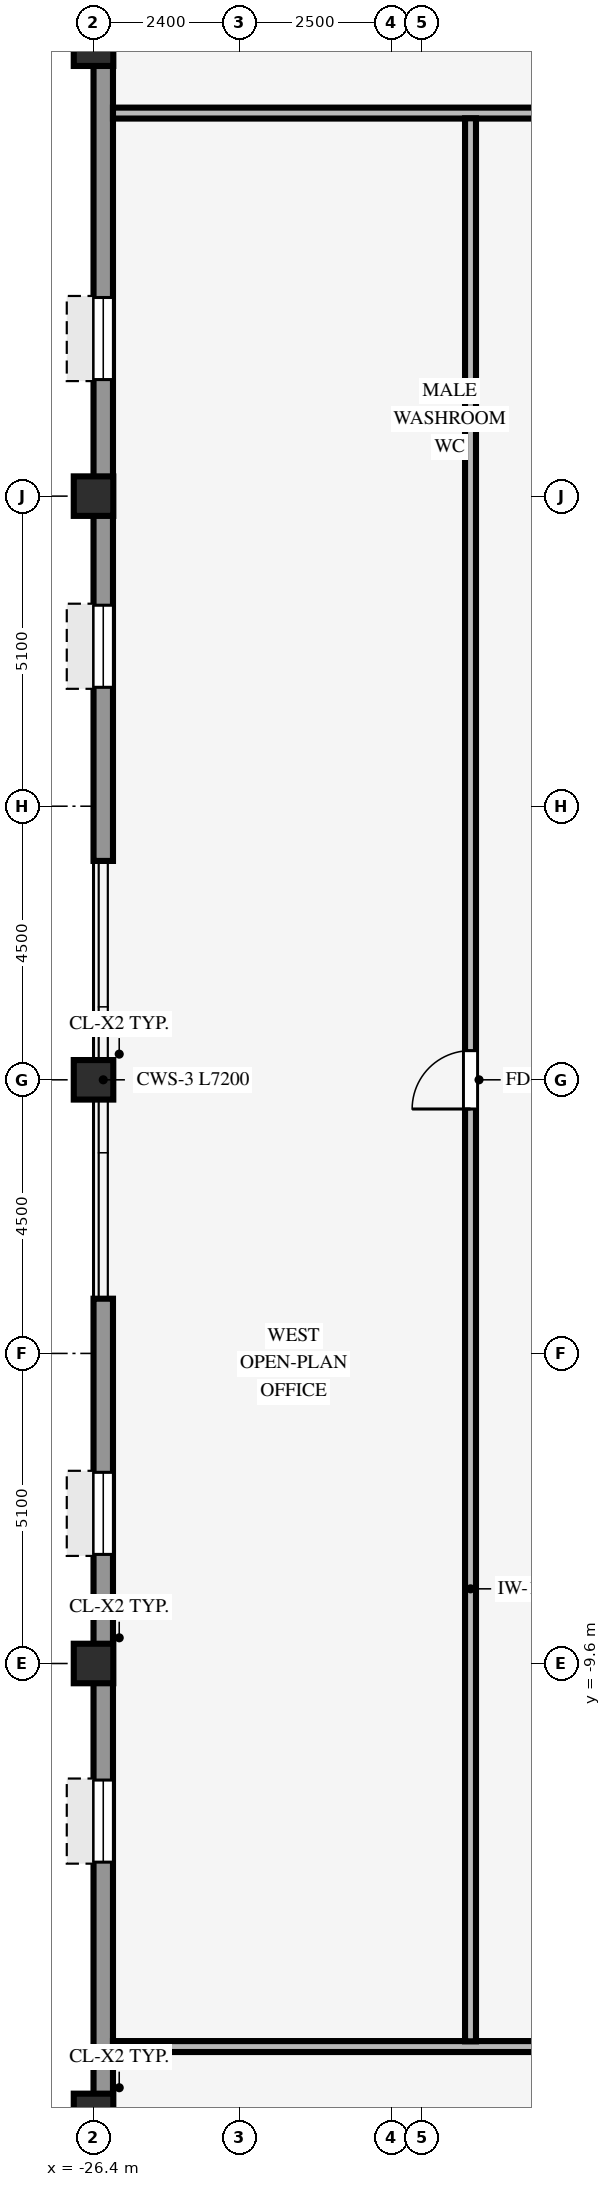
"""IFC4 building model, lengths in metres.
Left out: names, types, materials, properties, quantities, classifications, styles, units other than length and angle.
Written with IfcOpenShell. Run it as: python <this file> out.ifc"""

import sys

from ifc_helpers import new_model, si_unit, direction, frame, frame_2d, origin, origin_2d, place, context, subcontext, project, spatial, rectangle, hollow_rectangle, extrude, source, transform, mapped, element, fill, save


model = new_model("IFC4")
c1 = context("Model", 3, precision=1e-05, world=origin(), true_north=direction((0.0, 1.0)))
c2 = subcontext(c1, "Body", "Model", "MODEL_VIEW")
j1 = project(units=[si_unit("LENGTHUNIT", "METRE"), si_unit("PLANEANGLEUNIT", "RADIAN")], contexts=[c1])
p1 = place(None, origin())
s1 = spatial("IfcSite", under=j1, at=p1, CompositionType="ELEMENT")
p2 = place(p1, origin())
s2 = spatial("IfcBuilding", under=s1, at=p2, CompositionType="ELEMENT")
p3 = place(p2, frame((0.0, 0.0, 123.85)))
s3 = spatial("IfcBuildingStorey", under=s2, at=p3, CompositionType="ELEMENT", Elevation=123.85)
for number, where, z_axis, x_axis in (
    (1, (-26.4, -17.0, 0.0), (0.0, 0.0, 1.0), (1.0, 0.0, 0.0)),
    (2, (-26.4, -9.6, 0.0), (0.0, 0.0, 1.0), (1.0, 0.0, 0.0)),
    (3, (-26.4, 0.0, 0.0), (0.0, 0.0, 1.0), (1.0, 0.0, 0.0)),
    (4, (-26.4, 9.6, 0.0), (0.0, 0.0, 1.0), (1.0, 0.0, 0.0)),
    (5, (-26.4, 17.0, 0.0), (0.0, 0.0, 1.0), (1.0, 0.0, 0.0)),
):
    element("IfcColumn", number, at=place(p3, frame(where, z_axis=z_axis, x_axis=x_axis)), inside=s3, PredefinedType="COLUMN", context=c2, shape_type="SweptSolid", body=[
        extrude(hollow_rectangle(XDim=0.65, YDim=0.65, WallThickness=0.04, InnerFilletRadius=0.04, OuterFilletRadius=0.08, at=origin_2d()), origin(), (0.0, 0.0, 1.0), 3.37),
    ])
p4 = place(p3, frame((-26.24, -20.784, 0.0), z_axis=(0.0, 0.0, 1.0), x_axis=(0.0, 1.0, 0.0)))
e6 = element("IfcWall", 6, at=p4, inside=s3, PredefinedType="STANDARD", context=c2, shape_type="SweptSolid", body=[
    extrude(rectangle(XDim=17.184, YDim=0.32, at=frame_2d((8.592, 0.0))), origin(), (0.0, 0.0, 1.0), 2.705),
])
p5 = place(p4, frame((1.506, 0.0, 0.8)))
e7 = element("IfcOpeningElement", 7, at=p5, cuts=e6, PredefinedType="OPENING", context=c2, shape_type="SweptSolid", body=[
    extrude(rectangle(XDim=1.35, YDim=1.56, at=frame_2d((0.675, 0.78))), frame((0.0, 0.17, 0.0), z_axis=(0.0, -1.0, 0.0), x_axis=(1.0, 0.0, 0.0)), (0.0, 0.0, 1.0), 0.34),
])
p6 = place(p4, frame((7.917, 0.0, 0.8)))
e8 = element("IfcOpeningElement", 8, at=p6, cuts=e6, PredefinedType="OPENING", context=c2, shape_type="SweptSolid", body=[
    extrude(rectangle(XDim=1.35, YDim=1.56, at=frame_2d((0.675, 0.78))), frame((0.0, 0.17, 0.0), z_axis=(0.0, -1.0, 0.0), x_axis=(1.0, 0.0, 0.0)), (0.0, 0.0, 1.0), 0.34),
])
p7 = place(p4, frame((12.978, 0.0, 0.8)))
e9 = element("IfcOpeningElement", 9, at=p7, cuts=e6, PredefinedType="OPENING", context=c2, shape_type="SweptSolid", body=[
    extrude(rectangle(XDim=1.35, YDim=1.56, at=frame_2d((0.675, 0.78))), frame((0.0, 0.17, 0.0), z_axis=(0.0, -1.0, 0.0), x_axis=(1.0, 0.0, 0.0)), (0.0, 0.0, 1.0), 0.34),
])
p8 = place(p3, frame((-26.24, 3.6, 0.0), z_axis=(0.0, 0.0, 1.0), x_axis=(0.0, 1.0, 0.0)))
e10 = element("IfcWall", 10, at=p8, inside=s3, PredefinedType="STANDARD", context=c2, shape_type="SweptSolid", body=[
    extrude(rectangle(XDim=17.184, YDim=0.32, at=frame_2d((8.592, 0.0))), origin(), (0.0, 0.0, 1.0), 2.705),
])
p9 = place(p8, frame((2.856, 0.0, 0.8)))
e11 = element("IfcOpeningElement", 11, at=p9, cuts=e10, PredefinedType="OPENING", context=c2, shape_type="SweptSolid", body=[
    extrude(rectangle(XDim=1.35, YDim=1.56, at=frame_2d((0.675, 0.78))), frame((0.0, 0.17, 0.0), z_axis=(0.0, -1.0, 0.0), x_axis=(1.0, 0.0, 0.0)), (0.0, 0.0, 1.0), 0.34),
])
p10 = place(p8, frame((7.917, 0.0, 0.8)))
e12 = element("IfcOpeningElement", 12, at=p10, cuts=e10, PredefinedType="OPENING", context=c2, shape_type="SweptSolid", body=[
    extrude(rectangle(XDim=1.35, YDim=1.56, at=frame_2d((0.675, 0.78))), frame((0.0, 0.17, 0.0), z_axis=(0.0, -1.0, 0.0), x_axis=(1.0, 0.0, 0.0)), (0.0, 0.0, 1.0), 0.34),
])
p11 = place(p8, frame((14.328, 0.0, 0.8)))
e13 = element("IfcOpeningElement", 13, at=p11, cuts=e10, PredefinedType="OPENING", context=c2, shape_type="SweptSolid", body=[
    extrude(rectangle(XDim=1.35, YDim=1.56, at=frame_2d((0.675, 0.78))), frame((0.0, 0.17, 0.0), z_axis=(0.0, -1.0, 0.0), x_axis=(1.0, 0.0, 0.0)), (0.0, 0.0, 1.0), 0.34),
])
p12 = place(p3, frame((-26.08, -15.9, 0.0), z_axis=(0.0, 0.0, 1.0), x_axis=(1.0, 0.0, 0.0)))
e14 = element("IfcWall", 14, at=p12, inside=s3, PredefinedType="PARTITIONING", context=c2, shape_type="SweptSolid", body=[
    extrude(rectangle(XDim=52.16, YDim=0.18, at=frame_2d((26.08, 0.0))), origin(), (0.0, 0.0, 1.0), 3.36),
])
p13 = place(p12, frame((18.11, 0.0, 0.0)))
e15 = element("IfcOpeningElement", 15, at=p13, cuts=e14, PredefinedType="OPENING", context=c2, shape_type="SweptSolid", body=[
    extrude(rectangle(XDim=0.96, YDim=2.1, at=frame_2d((0.48, 1.05))), frame((0.0, 0.1, 0.0), z_axis=(0.0, -1.0, 0.0), x_axis=(1.0, 0.0, 0.0)), (0.0, 0.0, 1.0), 0.2),
])
p14 = place(p12, frame((40.905, 0.0, 0.0)))
e16 = element("IfcOpeningElement", 16, at=p14, cuts=e14, PredefinedType="OPENING", context=c2, shape_type="SweptSolid", body=[
    extrude(rectangle(XDim=0.96, YDim=2.1, at=frame_2d((0.48, 1.05))), frame((0.0, 0.1, 0.0), z_axis=(0.0, -1.0, 0.0), x_axis=(1.0, 0.0, 0.0)), (0.0, 0.0, 1.0), 0.2),
])
p15 = place(p12, frame((28.575, 0.0, 0.0)))
e17 = element("IfcOpeningElement", 17, at=p15, cuts=e14, PredefinedType="OPENING", context=c2, shape_type="SweptSolid", body=[
    extrude(rectangle(XDim=0.96, YDim=2.1, at=frame_2d((0.48, 1.05))), frame((0.0, 0.1, 0.0), z_axis=(0.0, -1.0, 0.0), x_axis=(1.0, 0.0, 0.0)), (0.0, 0.0, 1.0), 0.2),
])
p16 = place(p12, frame((9.585, 0.0, 0.0)))
e18 = element("IfcOpeningElement", 18, at=p16, cuts=e14, PredefinedType="OPENING", context=c2, shape_type="SweptSolid", body=[
    extrude(rectangle(XDim=0.96, YDim=2.1, at=frame_2d((0.48, 1.05))), frame((0.0, 0.1, 0.0), z_axis=(0.0, -1.0, 0.0), x_axis=(1.0, 0.0, 0.0)), (0.0, 0.0, 1.0), 0.2),
])
p17 = place(p3, frame((-26.08, 15.9, 0.0), z_axis=(0.0, 0.0, 1.0), x_axis=(1.0, 0.0, 0.0)))
e19 = element("IfcWall", 19, at=p17, inside=s3, PredefinedType="PARTITIONING", context=c2, shape_type="SweptSolid", body=[
    extrude(rectangle(XDim=52.16, YDim=0.18, at=frame_2d((26.08, 0.0))), origin(), (0.0, 0.0, 1.0), 3.36),
])
p18 = place(p17, frame((23.3, 0.0, 0.0)))
e20 = element("IfcOpeningElement", 20, at=p18, cuts=e19, PredefinedType="OPENING", context=c2, shape_type="SweptSolid", body=[
    extrude(rectangle(XDim=0.96, YDim=2.1, at=frame_2d((0.48, 1.05))), frame((0.0, 0.1, 0.0), z_axis=(0.0, -1.0, 0.0), x_axis=(1.0, 0.0, 0.0)), (0.0, 0.0, 1.0), 0.2),
])
p19 = place(p17, frame((11.15, 0.0, 0.0)))
e21 = element("IfcOpeningElement", 21, at=p19, cuts=e19, PredefinedType="OPENING", context=c2, shape_type="SweptSolid", body=[
    extrude(rectangle(XDim=0.96, YDim=2.1, at=frame_2d((0.48, 1.05))), frame((0.0, 0.1, 0.0), z_axis=(0.0, -1.0, 0.0), x_axis=(1.0, 0.0, 0.0)), (0.0, 0.0, 1.0), 0.2),
])
p20 = place(p3, frame((-20.2, -15.814, 0.0), z_axis=(0.0, 0.0, 1.0), x_axis=(0.0, 1.0, 0.0)))
e22 = element("IfcWall", 22, at=p20, inside=s3, PredefinedType="PARTITIONING", context=c2, shape_type="SweptSolid", body=[
    extrude(rectangle(XDim=31.628, YDim=0.18, at=frame_2d((15.814, 0.0))), origin(), (0.0, 0.0, 1.0), 3.36),
])
p21 = place(p20, frame((15.334, 0.0, 0.0)))
e23 = element("IfcOpeningElement", 23, at=p21, cuts=e22, PredefinedType="OPENING", context=c2, shape_type="SweptSolid", body=[
    extrude(rectangle(XDim=0.96, YDim=2.1, at=frame_2d((0.48, 1.05))), frame((0.0, 0.1, 0.0), z_axis=(0.0, -1.0, 0.0), x_axis=(1.0, 0.0, 0.0)), (0.0, 0.0, 1.0), 0.2),
])
m1 = source(origin(), c2, "Body", "SweptSolid", [
    extrude(rectangle(XDim=1.35, YDim=1.56, at=frame_2d((0.675, 0.78))), frame((0.0, 0.03, 0.0), z_axis=(0.0, -1.0, 0.0), x_axis=(1.0, 0.0, 0.0)), (0.0, 0.0, 1.0), 0.06),
])
p22 = place(p6, origin())
e24 = element("IfcWindow", 24, at=p22, inside=s3, PartitioningType="SINGLE_PANEL", PredefinedType="WINDOW", context=c2, shape_type="MappedRepresentation", body=[
    mapped(m1, transform((0.0, 0.0, 0.0), scale=1.0)),
])
fill(e8, e24)
p23 = place(p7, origin())
e25 = element("IfcWindow", 25, at=p23, inside=s3, PartitioningType="SINGLE_PANEL", PredefinedType="WINDOW", context=c2, shape_type="MappedRepresentation", body=[
    mapped(m1, transform((0.0, 0.0, 0.0), scale=1.0)),
])
fill(e9, e25)
p24 = place(p9, origin())
e26 = element("IfcWindow", 26, at=p24, inside=s3, PartitioningType="SINGLE_PANEL", PredefinedType="WINDOW", context=c2, shape_type="MappedRepresentation", body=[
    mapped(m1, transform((0.0, 0.0, 0.0), scale=1.0)),
])
fill(e11, e26)
p25 = place(p10, origin())
e27 = element("IfcWindow", 27, at=p25, inside=s3, PartitioningType="SINGLE_PANEL", PredefinedType="WINDOW", context=c2, shape_type="MappedRepresentation", body=[
    mapped(m1, transform((0.0, 0.0, 0.0), scale=1.0)),
])
fill(e12, e27)
m2 = source(origin(), c2, "Body", "SweptSolid", [
    extrude(rectangle(XDim=0.96, YDim=2.1, at=frame_2d((0.48, 1.05))), frame((0.0, 0.025, 0.0), z_axis=(0.0, -1.0, 0.0), x_axis=(1.0, 0.0, 0.0)), (0.0, 0.0, 1.0), 0.05),
])
p26 = place(p21, origin())
e28 = element("IfcDoor", 28, at=p26, inside=s3, OperationType="SINGLE_SWING_LEFT", PredefinedType="DOOR", context=c2, shape_type="MappedRepresentation", body=[
    mapped(m2, transform((0.0, 0.0, 0.0), scale=1.0)),
])
fill(e23, e28)
save(model, sys.argv[1])
